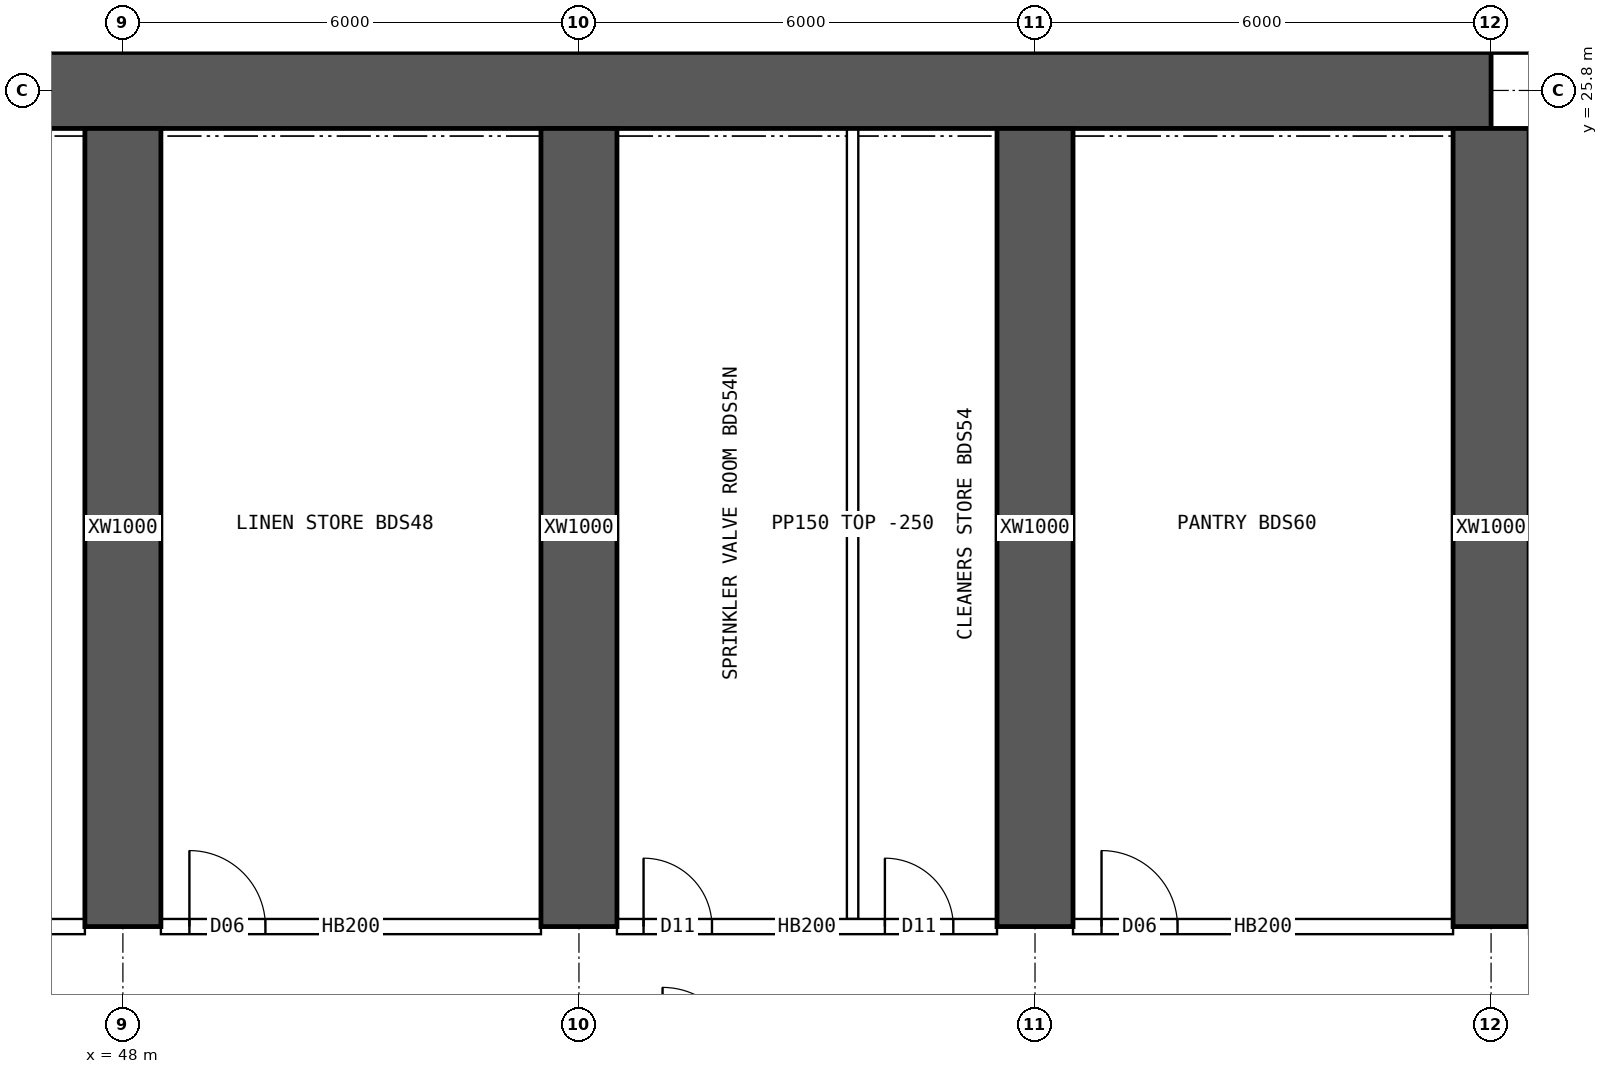
"""IFC4 building model, lengths in metres.
Left out: names, types, materials, properties, quantities, classifications, styles, units other than length and angle.
Written with IfcOpenShell. Run it as: python <this file> out.ifc"""

import sys

from ifc_helpers import new_model, si_unit, direction, frame, frame_2d, origin, place, context, subcontext, project, spatial, rectangle, extrude, element, fill, save


model = new_model("IFC4")
c1 = context("Model", 3, precision=1e-05, world=origin(), true_north=direction((0.0, 1.0)))
c2 = subcontext(c1, "Body", "Model", "MODEL_VIEW")
j1 = project(units=[si_unit("LENGTHUNIT", "METRE"), si_unit("PLANEANGLEUNIT", "RADIAN")], contexts=[c1])
p1 = place(None, origin())
s1 = spatial("IfcSite", under=j1, at=p1, CompositionType="ELEMENT")
p2 = place(p1, origin())
s2 = spatial("IfcBuilding", under=s1, at=p2, CompositionType="ELEMENT")
p3 = place(p2, frame((0.0, 0.0, 23.95)))
s3 = spatial("IfcBuildingStorey", under=s2, at=p3, CompositionType="ELEMENT", Elevation=23.95)
p4 = place(p3, frame((18.0, 25.8, 0.0), z_axis=(0.0, 0.0, 1.0), x_axis=(1.0, 0.0, 0.0)))
e1 = element("IfcWall", 1, at=p4, inside=s3, PredefinedType="SHEAR", context=c2, shape_type="SweptSolid", body=[
    extrude(rectangle(XDim=48.0, YDim=1.0, at=frame_2d((24.0, 0.0))), origin(), (0.0, 0.0, 1.0), 3.75),
])
for number, where, z_axis, x_axis in (
    (2, (48.0, 14.8, 0.0), (0.0, 0.0, 1.0), (0.0, 1.0, 0.0)),
    (3, (54.0, 14.8, 0.0), (0.0, 0.0, 1.0), (0.0, 1.0, 0.0)),
    (4, (60.0, 14.8, 0.0), (0.0, 0.0, 1.0), (0.0, 1.0, 0.0)),
    (5, (66.0, 14.8, 0.0), (0.0, 0.0, 1.0), (0.0, 1.0, 0.0)),
):
    element("IfcWall", number, at=place(p3, frame(where, z_axis=z_axis, x_axis=x_axis)), inside=s3, PredefinedType="SHEAR", context=c2, shape_type="SweptSolid", body=[
        extrude(rectangle(XDim=10.5, YDim=1.0, at=frame_2d((5.25, 0.0))), origin(), (0.0, 0.0, 1.0), 3.75),
    ])
p5 = place(p3, frame((42.5, 14.8, 0.0), z_axis=(0.0, 0.0, 1.0), x_axis=(1.0, 0.0, 0.0)))
e6 = element("IfcWall", 6, at=p5, inside=s3, PredefinedType="SOLIDWALL", context=c2, shape_type="SweptSolid", body=[
    extrude(rectangle(XDim=5.0, YDim=0.2, at=frame_2d((2.5, 0.0))), origin(), (0.0, 0.0, 1.0), 3.5),
])
p6 = place(p5, frame((0.35, 0.0, 0.0)))
e7 = element("IfcOpeningElement", 7, at=p6, cuts=e6, PredefinedType="OPENING", context=c2, shape_type="SweptSolid", body=[
    extrude(rectangle(XDim=0.9, YDim=2.1, at=frame_2d((0.45, 1.05))), frame((0.0, 0.11, 0.0), z_axis=(0.0, -1.0, 0.0), x_axis=(1.0, 0.0, 0.0)), (0.0, 0.0, 1.0), 0.22),
])
p7 = place(p5, frame((2.525, 0.0, 0.0)))
e8 = element("IfcOpeningElement", 8, at=p7, cuts=e6, PredefinedType="OPENING", context=c2, shape_type="SweptSolid", body=[
    extrude(rectangle(XDim=0.9, YDim=2.1, at=frame_2d((0.45, 1.05))), frame((0.0, 0.11, 0.0), z_axis=(0.0, -1.0, 0.0), x_axis=(1.0, 0.0, 0.0)), (0.0, 0.0, 1.0), 0.22),
])
p8 = place(p3, frame((48.5, 14.8, 0.0), z_axis=(0.0, 0.0, 1.0), x_axis=(1.0, 0.0, 0.0)))
e9 = element("IfcWall", 9, at=p8, inside=s3, PredefinedType="SOLIDWALL", context=c2, shape_type="SweptSolid", body=[
    extrude(rectangle(XDim=5.0, YDim=0.2, at=frame_2d((2.5, 0.0))), origin(), (0.0, 0.0, 1.0), 3.5),
])
p9 = place(p8, frame((0.375, 0.0, 0.0)))
e10 = element("IfcOpeningElement", 10, at=p9, cuts=e9, PredefinedType="OPENING", context=c2, shape_type="SweptSolid", body=[
    extrude(rectangle(XDim=1.0, YDim=2.1, at=frame_2d((0.5, 1.05))), frame((0.0, 0.11, 0.0), z_axis=(0.0, -1.0, 0.0), x_axis=(1.0, 0.0, 0.0)), (0.0, 0.0, 1.0), 0.22),
])
p10 = place(p3, frame((54.5, 14.8, 0.0), z_axis=(0.0, 0.0, 1.0), x_axis=(1.0, 0.0, 0.0)))
e11 = element("IfcWall", 11, at=p10, inside=s3, PredefinedType="SOLIDWALL", context=c2, shape_type="SweptSolid", body=[
    extrude(rectangle(XDim=5.0, YDim=0.2, at=frame_2d((2.5, 0.0))), origin(), (0.0, 0.0, 1.0), 3.5),
])
p11 = place(p10, frame((0.35, 0.0, 0.0)))
e12 = element("IfcOpeningElement", 12, at=p11, cuts=e11, PredefinedType="OPENING", context=c2, shape_type="SweptSolid", body=[
    extrude(rectangle(XDim=0.9, YDim=2.1, at=frame_2d((0.45, 1.05))), frame((0.0, 0.11, 0.0), z_axis=(0.0, -1.0, 0.0), x_axis=(1.0, 0.0, 0.0)), (0.0, 0.0, 1.0), 0.22),
])
p12 = place(p10, frame((3.525, 0.0, 0.0)))
e13 = element("IfcOpeningElement", 13, at=p12, cuts=e11, PredefinedType="OPENING", context=c2, shape_type="SweptSolid", body=[
    extrude(rectangle(XDim=0.9, YDim=2.1, at=frame_2d((0.45, 1.05))), frame((0.0, 0.11, 0.0), z_axis=(0.0, -1.0, 0.0), x_axis=(1.0, 0.0, 0.0)), (0.0, 0.0, 1.0), 0.22),
])
p13 = place(p3, frame((60.5, 14.8, 0.0), z_axis=(0.0, 0.0, 1.0), x_axis=(1.0, 0.0, 0.0)))
e14 = element("IfcWall", 14, at=p13, inside=s3, PredefinedType="SOLIDWALL", context=c2, shape_type="SweptSolid", body=[
    extrude(rectangle(XDim=5.0, YDim=0.2, at=frame_2d((2.5, 0.0))), origin(), (0.0, 0.0, 1.0), 3.5),
])
p14 = place(p13, frame((0.375, 0.0, 0.0)))
e15 = element("IfcOpeningElement", 15, at=p14, cuts=e14, PredefinedType="OPENING", context=c2, shape_type="SweptSolid", body=[
    extrude(rectangle(XDim=1.0, YDim=2.1, at=frame_2d((0.5, 1.05))), frame((0.0, 0.11, 0.0), z_axis=(0.0, -1.0, 0.0), x_axis=(1.0, 0.0, 0.0)), (0.0, 0.0, 1.0), 0.22),
])
p15 = place(p3, frame((57.6, 14.9, 0.0), z_axis=(0.0, 0.0, 1.0), x_axis=(0.0, 1.0, 0.0)))
e16 = element("IfcWall", 16, at=p15, inside=s3, PredefinedType="PARTITIONING", context=c2, shape_type="SweptSolid", body=[
    extrude(rectangle(XDim=10.4, YDim=0.15, at=frame_2d((5.2, 0.0))), origin(), (0.0, 0.0, 1.0), 3.5),
])
p16 = place(p9, origin())
e17 = element("IfcDoor", 17, at=p16, inside=s3, OperationType="SINGLE_SWING_LEFT", PredefinedType="DOOR", context=c2, shape_type="SweptSolid", body=[
    extrude(rectangle(XDim=1.0, YDim=2.1, at=frame_2d((0.5, 1.05))), frame((0.0, 0.025, 0.0), z_axis=(0.0, -1.0, 0.0), x_axis=(1.0, 0.0, 0.0)), (0.0, 0.0, 1.0), 0.05),
])
fill(e10, e17)
p17 = place(p11, origin())
e18 = element("IfcDoor", 18, at=p17, inside=s3, OperationType="SINGLE_SWING_LEFT", PredefinedType="DOOR", context=c2, shape_type="SweptSolid", body=[
    extrude(rectangle(XDim=0.9, YDim=2.1, at=frame_2d((0.45, 1.05))), frame((0.0, 0.025, 0.0), z_axis=(0.0, -1.0, 0.0), x_axis=(1.0, 0.0, 0.0)), (0.0, 0.0, 1.0), 0.05),
])
fill(e12, e18)
p18 = place(p12, origin())
e19 = element("IfcDoor", 19, at=p18, inside=s3, OperationType="SINGLE_SWING_LEFT", PredefinedType="DOOR", context=c2, shape_type="SweptSolid", body=[
    extrude(rectangle(XDim=0.9, YDim=2.1, at=frame_2d((0.45, 1.05))), frame((0.0, 0.025, 0.0), z_axis=(0.0, -1.0, 0.0), x_axis=(1.0, 0.0, 0.0)), (0.0, 0.0, 1.0), 0.05),
])
fill(e13, e19)
p19 = place(p14, origin())
e20 = element("IfcDoor", 20, at=p19, inside=s3, OperationType="SINGLE_SWING_LEFT", PredefinedType="DOOR", context=c2, shape_type="SweptSolid", body=[
    extrude(rectangle(XDim=1.0, YDim=2.1, at=frame_2d((0.5, 1.05))), frame((0.0, 0.025, 0.0), z_axis=(0.0, -1.0, 0.0), x_axis=(1.0, 0.0, 0.0)), (0.0, 0.0, 1.0), 0.05),
])
fill(e15, e20)
save(model, sys.argv[1])
